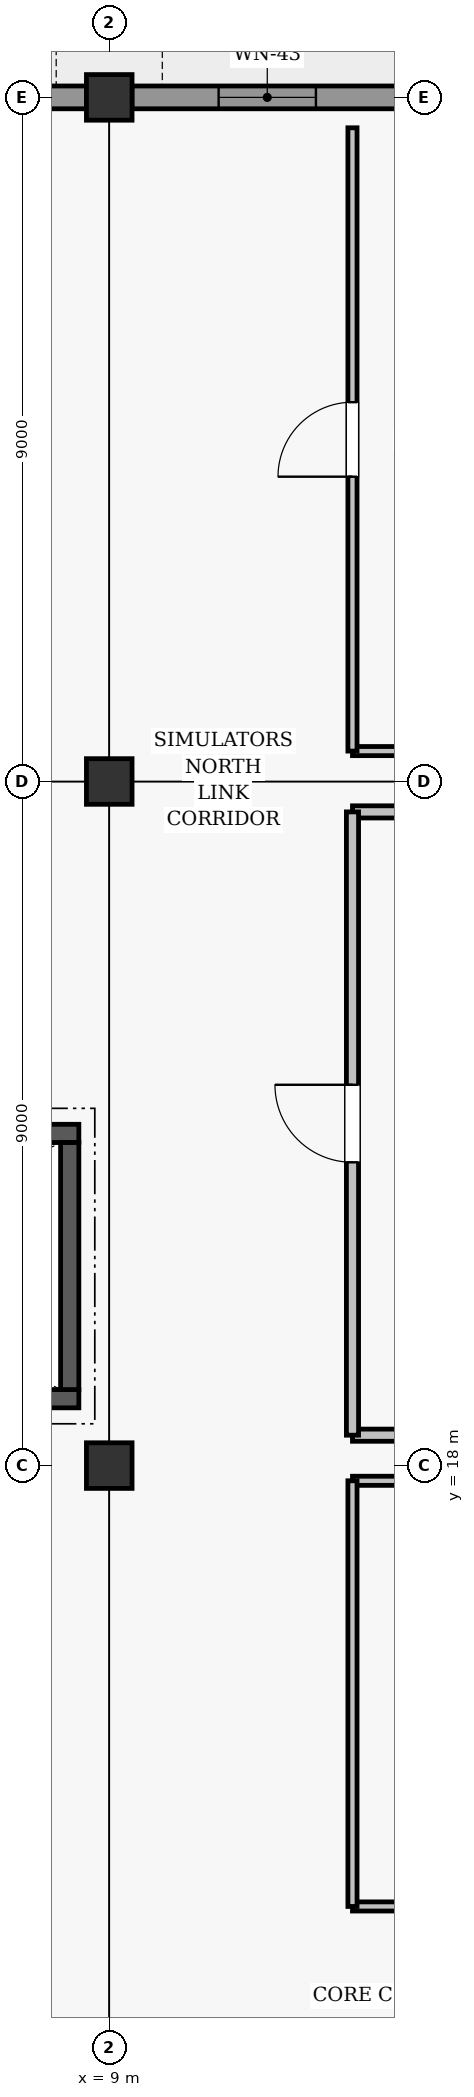
"""IFC4 building model, lengths in metres.
Left out: names, types, materials, properties, quantities, classifications, styles, units other than length and angle.
Written with IfcOpenShell. Run it as: python <this file> out.ifc"""

import sys

from ifc_helpers import new_model, si_unit, direction, frame, frame_2d, origin, origin_2d, place, context, subcontext, project, spatial, rectangle, extrude, element, fill, save


model = new_model("IFC4")
c1 = context("Model", 3, precision=1e-05, world=origin(), true_north=direction((0.0, 1.0)))
c2 = subcontext(c1, "Body", "Model", "MODEL_VIEW")
j1 = project(units=[si_unit("LENGTHUNIT", "METRE"), si_unit("PLANEANGLEUNIT", "RADIAN")], contexts=[c1])
p1 = place(None, origin())
s1 = spatial("IfcSite", under=j1, at=p1, CompositionType="ELEMENT")
p2 = place(p1, origin())
s2 = spatial("IfcBuilding", under=s1, at=p2, CompositionType="ELEMENT")
p3 = place(p2, frame((0.0, 0.0, 8.4)))
s3 = spatial("IfcBuildingStorey", under=s2, at=p3, CompositionType="ELEMENT", Elevation=8.4)
for number, where, z_axis, x_axis in (
    (1, (9.0, 18.0, 0.0), (0.0, 0.0, 1.0), (1.0, 0.0, 0.0)),
    (2, (9.0, 27.0, 0.0), (0.0, 0.0, 1.0), (1.0, 0.0, 0.0)),
    (3, (9.0, 36.0, 0.0), (0.0, 0.0, 1.0), (1.0, 0.0, 0.0)),
):
    element("IfcColumn", number, at=place(p3, frame(where, z_axis=z_axis, x_axis=x_axis)), inside=s3, PredefinedType="COLUMN", context=c2, shape_type="SweptSolid", body=[
        extrude(rectangle(XDim=0.6, YDim=0.6, at=origin_2d()), origin(), (0.0, 0.0, 1.0), 3.6),
    ])
p4 = place(p3, frame((0.298, 36.0, 0.0), z_axis=(0.0, 0.0, 1.0), x_axis=(1.0, 0.0, 0.0)))
e4 = element("IfcWall", 4, at=p4, inside=s3, PredefinedType="SOLIDWALL", context=c2, shape_type="SweptSolid", body=[
    extrude(rectangle(XDim=8.404, YDim=0.3, at=frame_2d((4.202, 0.0))), origin(), (0.0, 0.0, 1.0), 2.862),
])
p5 = place(p4, frame((1.081, 0.0, 0.85)))
e5 = element("IfcOpeningElement", 5, at=p5, cuts=e4, PredefinedType="OPENING", context=c2, shape_type="SweptSolid", body=[
    extrude(rectangle(XDim=1.36, YDim=1.38, at=frame_2d((0.68, 0.69))), frame((0.0, 0.16, 0.0), z_axis=(0.0, -1.0, 0.0), x_axis=(1.0, 0.0, 0.0)), (0.0, 0.0, 1.0), 0.32),
])
p6 = place(p4, frame((3.522, 0.0, 0.85)))
e6 = element("IfcOpeningElement", 6, at=p6, cuts=e4, PredefinedType="OPENING", context=c2, shape_type="SweptSolid", body=[
    extrude(rectangle(XDim=1.36, YDim=1.38, at=frame_2d((0.68, 0.69))), frame((0.0, 0.16, 0.0), z_axis=(0.0, -1.0, 0.0), x_axis=(1.0, 0.0, 0.0)), (0.0, 0.0, 1.0), 0.32),
])
p7 = place(p4, frame((5.963, 0.0, 0.85)))
e7 = element("IfcOpeningElement", 7, at=p7, cuts=e4, PredefinedType="OPENING", context=c2, shape_type="SweptSolid", body=[
    extrude(rectangle(XDim=1.36, YDim=1.38, at=frame_2d((0.68, 0.69))), frame((0.0, 0.16, 0.0), z_axis=(0.0, -1.0, 0.0), x_axis=(1.0, 0.0, 0.0)), (0.0, 0.0, 1.0), 0.32),
])
p8 = place(p3, frame((9.298, 36.0, 0.0), z_axis=(0.0, 0.0, 1.0), x_axis=(1.0, 0.0, 0.0)))
e8 = element("IfcWall", 8, at=p8, inside=s3, PredefinedType="SOLIDWALL", context=c2, shape_type="SweptSolid", body=[
    extrude(rectangle(XDim=8.404, YDim=0.3, at=frame_2d((4.202, 0.0))), origin(), (0.0, 0.0, 1.0), 2.862),
])
p9 = place(p8, frame((1.141, 0.0, 0.85)))
e9 = element("IfcOpeningElement", 9, at=p9, cuts=e8, PredefinedType="OPENING", context=c2, shape_type="SweptSolid", body=[
    extrude(rectangle(XDim=1.28, YDim=1.34, at=frame_2d((0.64, 0.67))), frame((0.0, 0.16, 0.0), z_axis=(0.0, -1.0, 0.0), x_axis=(1.0, 0.0, 0.0)), (0.0, 0.0, 1.0), 0.32),
])
p10 = place(p8, frame((3.562, 0.0, 0.85)))
e10 = element("IfcOpeningElement", 10, at=p10, cuts=e8, PredefinedType="OPENING", context=c2, shape_type="SweptSolid", body=[
    extrude(rectangle(XDim=1.28, YDim=1.34, at=frame_2d((0.64, 0.67))), frame((0.0, 0.16, 0.0), z_axis=(0.0, -1.0, 0.0), x_axis=(1.0, 0.0, 0.0)), (0.0, 0.0, 1.0), 0.32),
])
p11 = place(p8, frame((5.983, 0.0, 0.85)))
e11 = element("IfcOpeningElement", 11, at=p11, cuts=e8, PredefinedType="OPENING", context=c2, shape_type="SweptSolid", body=[
    extrude(rectangle(XDim=1.28, YDim=1.34, at=frame_2d((0.64, 0.67))), frame((0.0, 0.16, 0.0), z_axis=(0.0, -1.0, 0.0), x_axis=(1.0, 0.0, 0.0)), (0.0, 0.0, 1.0), 0.32),
])
p12 = place(p3, frame((0.16, 18.88, 0.0), z_axis=(0.0, 0.0, 1.0), x_axis=(1.0, 0.0, 0.0)))
e12 = element("IfcWall", 12, at=p12, inside=s3, PredefinedType="SHEAR", context=c2, shape_type="SweptSolid", body=[
    extrude(rectangle(XDim=8.44, YDim=0.24, at=frame_2d((4.22, 0.0))), origin(), (0.0, 0.0, 1.0), 3.35),
])
p13 = place(p12, frame((0.48, 0.0, 0.0)))
e13 = element("IfcOpeningElement", 13, at=p13, cuts=e12, PredefinedType="OPENING", context=c2, shape_type="SweptSolid", body=[
    extrude(rectangle(XDim=1.08, YDim=2.08, at=frame_2d((0.54, 1.04))), frame((0.0, 0.13, 0.0), z_axis=(0.0, -1.0, 0.0), x_axis=(1.0, 0.0, 0.0)), (0.0, 0.0, 1.0), 0.26),
])
p14 = place(p3, frame((0.16, 22.37, 0.0), z_axis=(0.0, 0.0, 1.0), x_axis=(1.0, 0.0, 0.0)))
e14 = element("IfcWall", 14, at=p14, inside=s3, PredefinedType="SHEAR", context=c2, shape_type="SweptSolid", body=[
    extrude(rectangle(XDim=8.44, YDim=0.24, at=frame_2d((4.22, 0.0))), origin(), (0.0, 0.0, 1.0), 3.35),
])
p15 = place(p3, frame((8.48, 19.0, 0.0), z_axis=(0.0, 0.0, 1.0), x_axis=(0.0, 1.0, 0.0)))
e15 = element("IfcWall", 15, at=p15, inside=s3, PredefinedType="SHEAR", context=c2, shape_type="SweptSolid", body=[
    extrude(rectangle(XDim=3.25, YDim=0.24, at=frame_2d((1.625, 0.0))), origin(), (0.0, 0.0, 1.0), 3.35),
])
p16 = place(p3, frame((12.2, 12.2, 0.0), z_axis=(0.0, 0.0, 1.0), x_axis=(1.0, 0.0, 0.0)))
e16 = element("IfcWall", 16, at=p16, inside=s3, PredefinedType="PARTITIONING", context=c2, shape_type="SweptSolid", body=[
    extrude(rectangle(XDim=23.4, YDim=0.12, at=frame_2d((11.7, 0.0))), origin(), (0.0, 0.0, 1.0), 2.895),
])
p17 = place(p16, frame((9.43, 0.0, 0.0)))
e17 = element("IfcOpeningElement", 17, at=p17, cuts=e16, PredefinedType="OPENING", context=c2, shape_type="SweptSolid", body=[
    extrude(rectangle(XDim=1.74, YDim=2.18, at=frame_2d((0.87, 1.09))), frame((0.0, 0.07, 0.0), z_axis=(0.0, -1.0, 0.0), x_axis=(1.0, 0.0, 0.0)), (0.0, 0.0, 1.0), 0.14),
])
p18 = place(p3, frame((12.2, 17.8, 0.0), z_axis=(0.0, 0.0, 1.0), x_axis=(1.0, 0.0, 0.0)))
e18 = element("IfcWall", 18, at=p18, inside=s3, PredefinedType="PARTITIONING", context=c2, shape_type="SweptSolid", body=[
    extrude(rectangle(XDim=23.4, YDim=0.12, at=frame_2d((11.7, 0.0))), origin(), (0.0, 0.0, 1.0), 2.845),
])
p19 = place(p3, frame((12.2, 12.2, 0.0), z_axis=(0.0, 0.0, 1.0), x_axis=(0.0, 1.0, 0.0)))
e19 = element("IfcWall", 19, at=p19, inside=s3, PredefinedType="PARTITIONING", context=c2, shape_type="SweptSolid", body=[
    extrude(rectangle(XDim=5.6, YDim=0.12, at=frame_2d((2.8, 0.0))), origin(), (0.0, 0.0, 1.0), 2.845),
])
for number, where, z_axis, x_axis in (
    (20, (12.2, 18.4, 0.0), (0.0, 0.0, 1.0), (1.0, 0.0, 0.0)),
    (21, (12.2, 26.6, 0.0), (0.0, 0.0, 1.0), (1.0, 0.0, 0.0)),
):
    element("IfcWall", number, at=place(p3, frame(where, z_axis=z_axis, x_axis=x_axis)), inside=s3, PredefinedType="PARTITIONING", context=c2, shape_type="SweptSolid", body=[
        extrude(rectangle(XDim=41.4, YDim=0.16, at=frame_2d((20.7, 0.0))), origin(), (0.0, 0.0, 1.0), 2.895),
    ])
p20 = place(p3, frame((12.2, 18.4, 0.0), z_axis=(0.0, 0.0, 1.0), x_axis=(0.0, 1.0, 0.0)))
e22 = element("IfcWall", 22, at=p20, inside=s3, PredefinedType="PARTITIONING", context=c2, shape_type="SweptSolid", body=[
    extrude(rectangle(XDim=8.2, YDim=0.16, at=frame_2d((4.1, 0.0))), origin(), (0.0, 0.0, 1.0), 3.35),
])
p21 = place(p20, frame((3.59, 0.0, 0.0)))
e23 = element("IfcOpeningElement", 23, at=p21, cuts=e22, PredefinedType="OPENING", context=c2, shape_type="SweptSolid", body=[
    extrude(rectangle(XDim=1.02, YDim=2.1, at=frame_2d((0.51, 1.05))), frame((0.0, 0.09, 0.0), z_axis=(0.0, -1.0, 0.0), x_axis=(1.0, 0.0, 0.0)), (0.0, 0.0, 1.0), 0.18),
])
p22 = place(p3, frame((12.2, 27.4, 0.0), z_axis=(0.0, 0.0, 1.0), x_axis=(1.0, 0.0, 0.0)))
e24 = element("IfcWall", 24, at=p22, inside=s3, PredefinedType="PARTITIONING", context=c2, shape_type="SweptSolid", body=[
    extrude(rectangle(XDim=41.4, YDim=0.12, at=frame_2d((20.7, 0.0))), origin(), (0.0, 0.0, 1.0), 2.845),
])
p23 = place(p3, frame((12.2, 27.4, 0.0), z_axis=(0.0, 0.0, 1.0), x_axis=(0.0, 1.0, 0.0)))
e25 = element("IfcWall", 25, at=p23, inside=s3, PredefinedType="PARTITIONING", context=c2, shape_type="SweptSolid", body=[
    extrude(rectangle(XDim=8.2, YDim=0.12, at=frame_2d((4.1, 0.0))), origin(), (0.0, 0.0, 1.0), 3.35),
])
p24 = place(p23, frame((3.61, 0.0, 0.0)))
e26 = element("IfcOpeningElement", 26, at=p24, cuts=e25, PredefinedType="OPENING", context=c2, shape_type="SweptSolid", body=[
    extrude(rectangle(XDim=0.98, YDim=2.08, at=frame_2d((0.49, 1.04))), frame((0.0, 0.07, 0.0), z_axis=(0.0, -1.0, 0.0), x_axis=(1.0, 0.0, 0.0)), (0.0, 0.0, 1.0), 0.14),
])
p25 = place(p9, origin())
e27 = element("IfcWindow", 27, at=p25, inside=s3, PartitioningType="SINGLE_PANEL", PredefinedType="WINDOW", context=c2, shape_type="SweptSolid", body=[
    extrude(rectangle(XDim=1.28, YDim=1.34, at=frame_2d((0.64, 0.67))), frame((0.0, 0.03, 0.0), z_axis=(0.0, -1.0, 0.0), x_axis=(1.0, 0.0, 0.0)), (0.0, 0.0, 1.0), 0.06),
])
fill(e9, e27)
p26 = place(p21, origin())
e28 = element("IfcDoor", 28, at=p26, inside=s3, OperationType="SINGLE_SWING_RIGHT", PredefinedType="DOOR", context=c2, shape_type="SweptSolid", body=[
    extrude(rectangle(XDim=1.02, YDim=2.1, at=frame_2d((0.51, 1.05))), frame((0.0, 0.025, 0.0), z_axis=(0.0, -1.0, 0.0), x_axis=(1.0, 0.0, 0.0)), (0.0, 0.0, 1.0), 0.05),
])
fill(e23, e28)
p27 = place(p24, origin())
e29 = element("IfcDoor", 29, at=p27, inside=s3, OperationType="SINGLE_SWING_LEFT", PredefinedType="DOOR", context=c2, shape_type="SweptSolid", body=[
    extrude(rectangle(XDim=0.98, YDim=2.08, at=frame_2d((0.49, 1.04))), frame((0.0, 0.025, 0.0), z_axis=(0.0, -1.0, 0.0), x_axis=(1.0, 0.0, 0.0)), (0.0, 0.0, 1.0), 0.05),
])
fill(e26, e29)
save(model, sys.argv[1])
